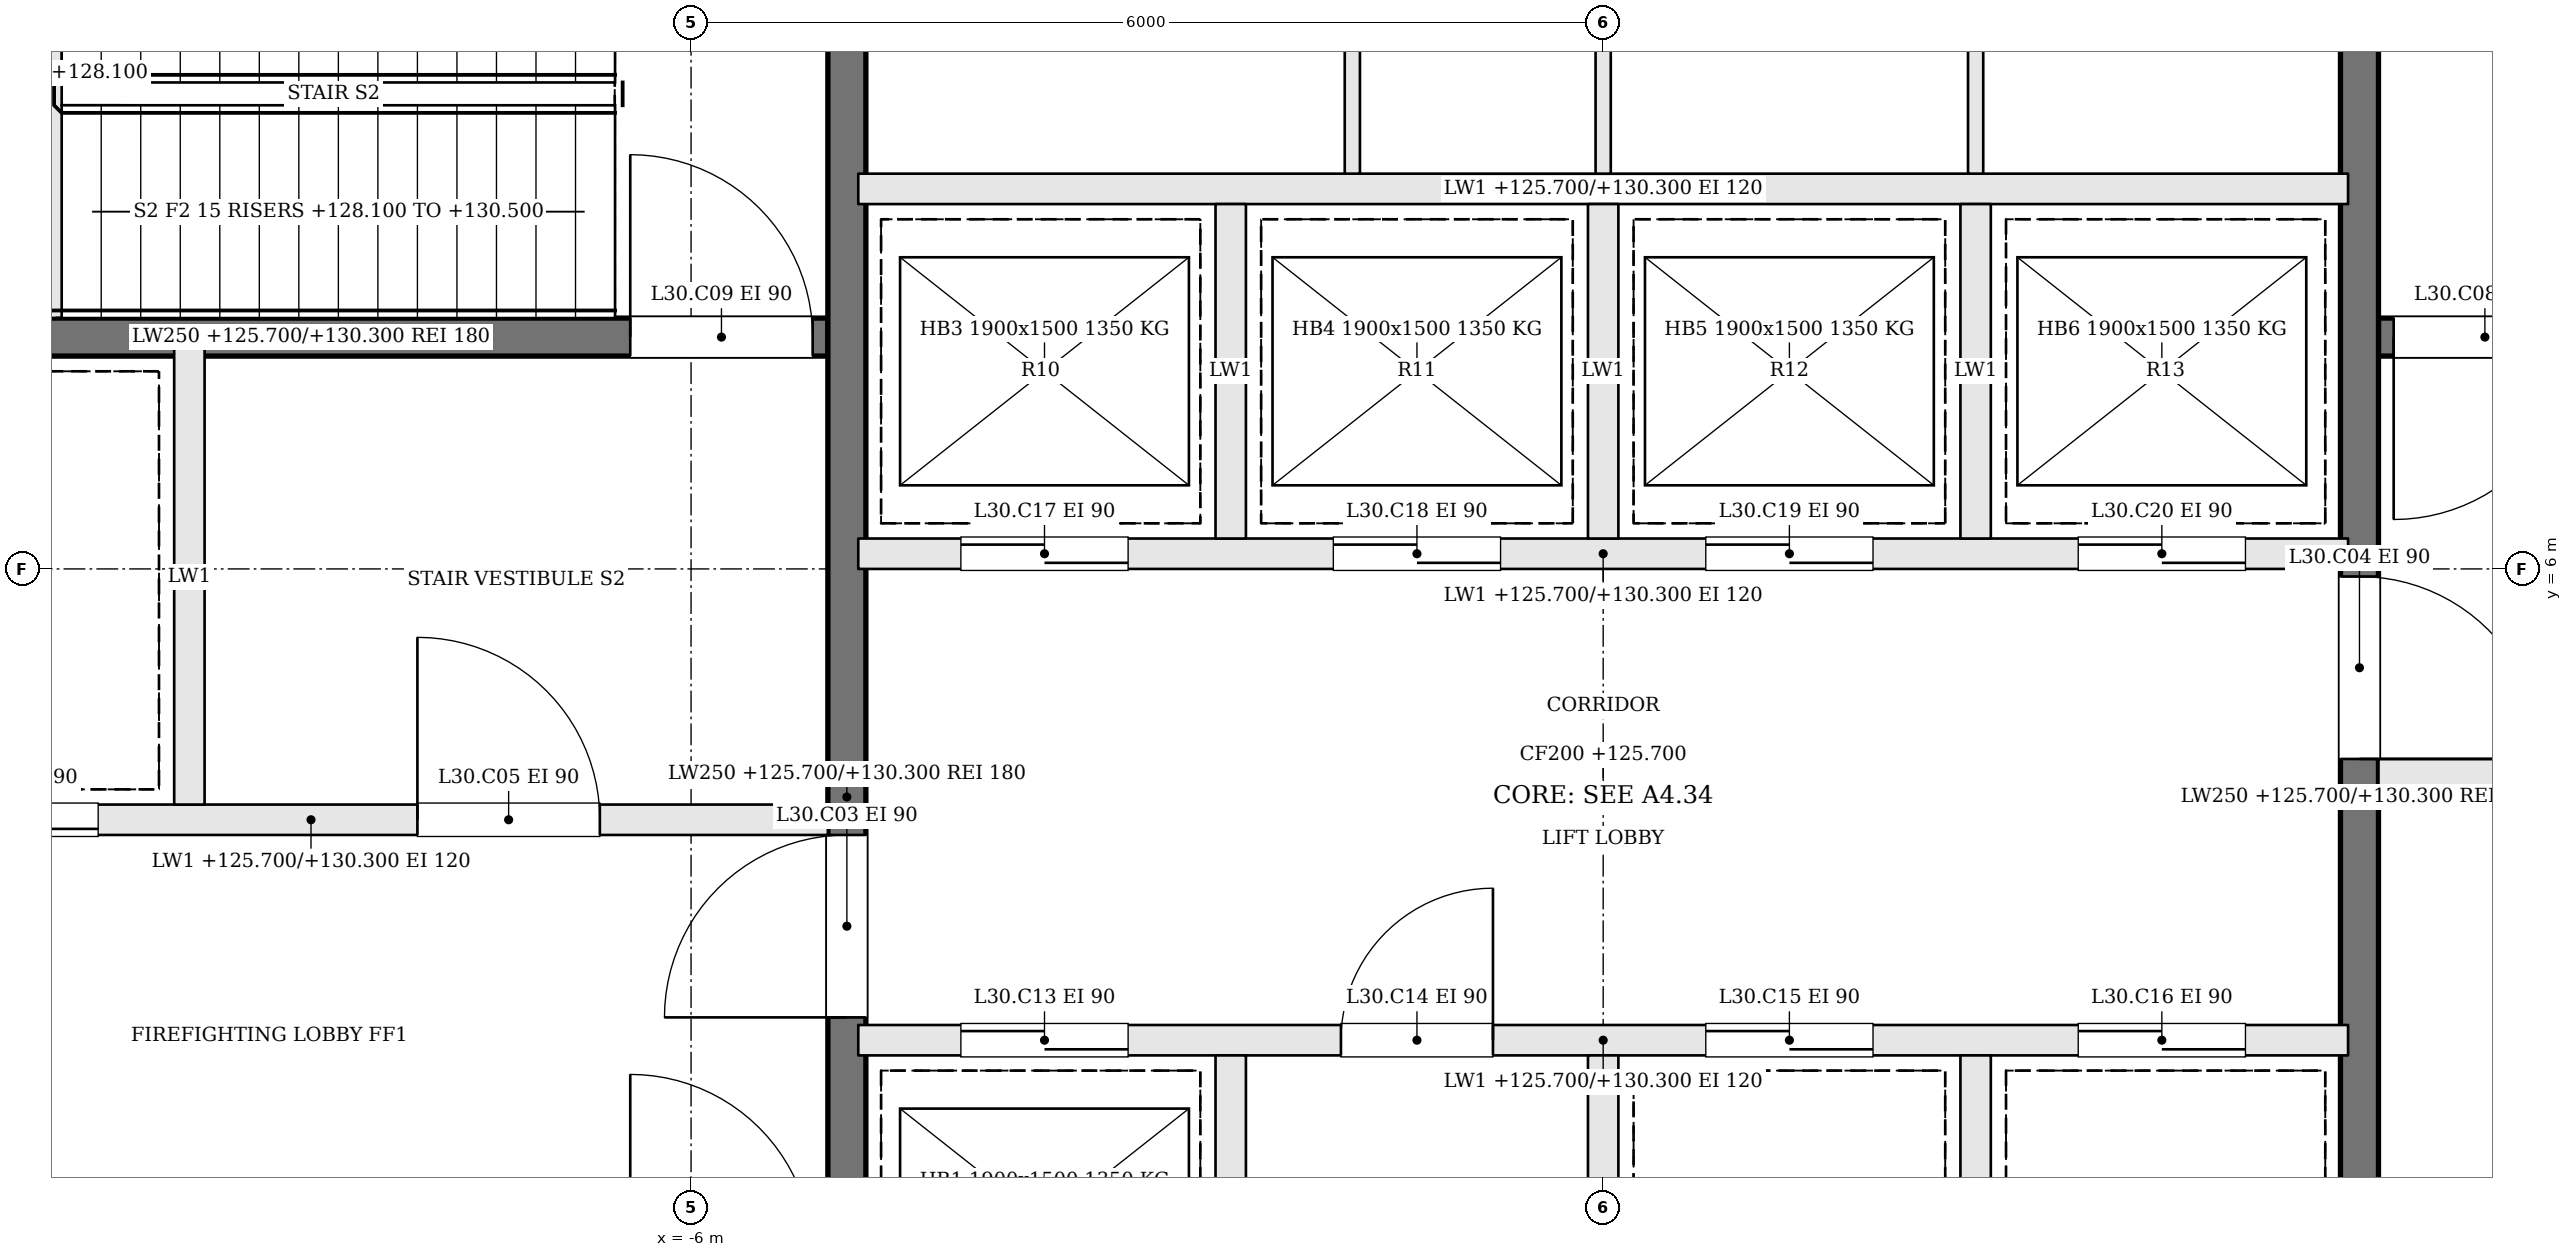
"""IFC4 building model, lengths in metres.
Left out: names, types, materials, properties, quantities, classifications, styles, units other than length and angle.
Written with IfcOpenShell. Run it as: python <this file> out.ifc"""

import sys

from ifc_helpers import new_model, si_unit, direction, frame, frame_2d, origin, place, context, subcontext, project, spatial, rectangle, extrude, element, fill, save


model = new_model("IFC4")
c1 = context("Model", 3, precision=1e-05, world=origin(), true_north=direction((0.0, 1.0)))
c2 = subcontext(c1, "Body", "Model", "MODEL_VIEW")
j1 = project(units=[si_unit("LENGTHUNIT", "METRE"), si_unit("PLANEANGLEUNIT", "RADIAN")], contexts=[c1])
p1 = place(None, origin())
s1 = spatial("IfcSite", under=j1, at=p1, CompositionType="ELEMENT")
p2 = place(p1, origin())
s2 = spatial("IfcBuilding", under=s1, at=p2, CompositionType="ELEMENT")
p3 = place(p2, frame((0.0, 0.0, 125.7)))
s3 = spatial("IfcBuildingStorey", under=s2, at=p3, CompositionType="ELEMENT", Elevation=125.7)
p4 = place(p3, frame((11.9, 7.525, 0.0), z_axis=(0.0, 0.0, 1.0), x_axis=(-1.0, 0.0, 0.0)))
e1 = element("IfcWall", 1, at=p4, inside=s3, PredefinedType="SOLIDWALL", context=c2, shape_type="SweptSolid", body=[
    extrude(rectangle(XDim=6.8, YDim=0.25, at=frame_2d((3.4, 0.0))), origin(), (0.0, 0.0, 1.0), 4.6),
])
p5 = place(p4, frame((5.5, 0.0, 0.0)))
e2 = element("IfcOpeningElement", 2, at=p5, cuts=e1, PredefinedType="OPENING", context=c2, shape_type="SweptSolid", body=[
    extrude(rectangle(XDim=1.2, YDim=2.1, at=frame_2d((0.6, 1.05))), frame((0.0, 0.135, 0.0), z_axis=(0.0, -1.0, 0.0), x_axis=(1.0, 0.0, 0.0)), (0.0, 0.0, 1.0), 0.27),
])
p6 = place(p3, frame((-11.9, 4.35, 0.0), z_axis=(0.0, 0.0, 1.0), x_axis=(1.0, 0.0, 0.0)))
e3 = element("IfcWall", 3, at=p6, inside=s3, PredefinedType="SOLIDWALL", context=c2, shape_type="SweptSolid", body=[
    extrude(rectangle(XDim=6.8, YDim=0.2, at=frame_2d((3.4, 0.0))), origin(), (0.0, 0.0, 1.0), 4.6),
])
p7 = place(p6, frame((4.1, 0.0, 0.0)))
e4 = element("IfcOpeningElement", 4, at=p7, cuts=e3, PredefinedType="OPENING", context=c2, shape_type="SweptSolid", body=[
    extrude(rectangle(XDim=1.2, YDim=2.1, at=frame_2d((0.6, 1.05))), frame((0.0, 0.11, 0.0), z_axis=(0.0, -1.0, 0.0), x_axis=(1.0, 0.0, 0.0)), (0.0, 0.0, 1.0), 0.22),
])
p8 = place(p6, frame((0.8, 0.0, 0.0)))
e5 = element("IfcOpeningElement", 5, at=p8, cuts=e3, PredefinedType="OPENING", context=c2, shape_type="SweptSolid", body=[
    extrude(rectangle(XDim=1.2, YDim=2.1, at=frame_2d((0.6, 1.05))), frame((0.0, 0.11, 0.0), z_axis=(0.0, -1.0, 0.0), x_axis=(1.0, 0.0, 0.0)), (0.0, 0.0, 1.0), 0.22),
])
p9 = place(p3, frame((11.9, 4.65, 0.0), z_axis=(0.0, 0.0, 1.0), x_axis=(-1.0, 0.0, 0.0)))
e6 = element("IfcWall", 6, at=p9, inside=s3, PredefinedType="SOLIDWALL", context=c2, shape_type="SweptSolid", body=[
    extrude(rectangle(XDim=6.8, YDim=0.2, at=frame_2d((3.4, 0.0))), origin(), (0.0, 0.0, 1.0), 4.6),
])
p10 = place(p9, frame((4.1, 0.0, 0.0)))
e7 = element("IfcOpeningElement", 7, at=p10, cuts=e6, PredefinedType="OPENING", context=c2, shape_type="SweptSolid", body=[
    extrude(rectangle(XDim=1.2, YDim=2.1, at=frame_2d((0.6, 1.05))), frame((0.0, 0.11, 0.0), z_axis=(0.0, -1.0, 0.0), x_axis=(1.0, 0.0, 0.0)), (0.0, 0.0, 1.0), 0.22),
])
p11 = place(p9, frame((0.8, 0.0, 0.0)))
e8 = element("IfcOpeningElement", 8, at=p11, cuts=e6, PredefinedType="OPENING", context=c2, shape_type="SweptSolid", body=[
    extrude(rectangle(XDim=1.2, YDim=2.1, at=frame_2d((0.6, 1.05))), frame((0.0, 0.11, 0.0), z_axis=(0.0, -1.0, 0.0), x_axis=(1.0, 0.0, 0.0)), (0.0, 0.0, 1.0), 0.22),
])
p12 = place(p3, frame((-11.9, 7.525, 0.0), z_axis=(0.0, 0.0, 1.0), x_axis=(1.0, 0.0, 0.0)))
e9 = element("IfcWall", 9, at=p12, inside=s3, PredefinedType="SOLIDWALL", context=c2, shape_type="SweptSolid", body=[
    extrude(rectangle(XDim=6.8, YDim=0.25, at=frame_2d((3.4, 0.0))), origin(), (0.0, 0.0, 1.0), 4.6),
])
p13 = place(p12, frame((5.5, 0.0, 0.0)))
e10 = element("IfcOpeningElement", 10, at=p13, cuts=e9, PredefinedType="OPENING", context=c2, shape_type="SweptSolid", body=[
    extrude(rectangle(XDim=1.2, YDim=2.1, at=frame_2d((0.6, 1.05))), frame((0.0, 0.135, 0.0), z_axis=(0.0, -1.0, 0.0), x_axis=(1.0, 0.0, 0.0)), (0.0, 0.0, 1.0), 0.27),
])
p14 = place(p3, frame((-9.3, 4.45, 0.0), z_axis=(0.0, 0.0, 1.0), x_axis=(0.0, 1.0, 0.0)))
e11 = element("IfcWall", 11, at=p14, inside=s3, PredefinedType="SOLIDWALL", context=c2, shape_type="SweptSolid", body=[
    extrude(rectangle(XDim=3.0, YDim=0.2, at=frame_2d((1.5, 0.0))), origin(), (0.0, 0.0, 1.0), 4.6),
])
p15 = place(p3, frame((-4.975, -1.9, 0.0), z_axis=(0.0, 0.0, 1.0), x_axis=(0.0, 1.0, 0.0)))
e12 = element("IfcWall", 12, at=p15, inside=s3, PredefinedType="SOLIDWALL", context=c2, shape_type="SweptSolid", body=[
    extrude(rectangle(XDim=12.8, YDim=0.25, at=frame_2d((6.4, 0.0))), origin(), (0.0, 0.0, 1.0), 4.6),
])
p16 = place(p15, frame((4.95, 0.0, 0.0)))
e13 = element("IfcOpeningElement", 13, at=p16, cuts=e12, PredefinedType="OPENING", context=c2, shape_type="SweptSolid", body=[
    extrude(rectangle(XDim=1.2, YDim=2.1, at=frame_2d((0.6, 1.05))), frame((0.0, 0.135, 0.0), z_axis=(0.0, -1.0, 0.0), x_axis=(1.0, 0.0, 0.0)), (0.0, 0.0, 1.0), 0.27),
])
p17 = place(p3, frame((4.975, 10.9, 0.0), z_axis=(0.0, 0.0, 1.0), x_axis=(0.0, -1.0, 0.0)))
e14 = element("IfcWall", 14, at=p17, inside=s3, PredefinedType="SOLIDWALL", context=c2, shape_type="SweptSolid", body=[
    extrude(rectangle(XDim=12.8, YDim=0.25, at=frame_2d((6.4, 0.0))), origin(), (0.0, 0.0, 1.0), 4.6),
])
p18 = place(p17, frame((4.95, 0.0, 0.0)))
e15 = element("IfcOpeningElement", 15, at=p18, cuts=e14, PredefinedType="OPENING", context=c2, shape_type="SweptSolid", body=[
    extrude(rectangle(XDim=1.2, YDim=2.1, at=frame_2d((0.6, 1.05))), frame((0.0, 0.135, 0.0), z_axis=(0.0, -1.0, 0.0), x_axis=(1.0, 0.0, 0.0)), (0.0, 0.0, 1.0), 0.27),
])
p19 = place(p3, frame((-4.9, 2.9, 0.0), z_axis=(0.0, 0.0, 1.0), x_axis=(1.0, 0.0, 0.0)))
e16 = element("IfcWall", 16, at=p19, inside=s3, PredefinedType="SOLIDWALL", context=c2, shape_type="SweptSolid", body=[
    extrude(rectangle(XDim=9.8, YDim=0.2, at=frame_2d((4.9, 0.0))), origin(), (0.0, 0.0, 1.0), 4.6),
])
p20 = place(p19, frame((0.675, 0.0, 0.0)))
e17 = element("IfcOpeningElement", 17, at=p20, cuts=e16, PredefinedType="OPENING", context=c2, shape_type="SweptSolid", body=[
    extrude(rectangle(XDim=1.1, YDim=2.1, at=frame_2d((0.55, 1.05))), frame((0.0, 0.11, 0.0), z_axis=(0.0, -1.0, 0.0), x_axis=(1.0, 0.0, 0.0)), (0.0, 0.0, 1.0), 0.22),
])
p21 = place(p19, frame((3.175, 0.0, 0.0)))
e18 = element("IfcOpeningElement", 18, at=p21, cuts=e16, PredefinedType="OPENING", context=c2, shape_type="SweptSolid", body=[
    extrude(rectangle(XDim=1.0, YDim=2.1, at=frame_2d((0.5, 1.05))), frame((0.0, 0.11, 0.0), z_axis=(0.0, -1.0, 0.0), x_axis=(1.0, 0.0, 0.0)), (0.0, 0.0, 1.0), 0.22),
])
p22 = place(p19, frame((5.575, 0.0, 0.0)))
e19 = element("IfcOpeningElement", 19, at=p22, cuts=e16, PredefinedType="OPENING", context=c2, shape_type="SweptSolid", body=[
    extrude(rectangle(XDim=1.1, YDim=2.1, at=frame_2d((0.55, 1.05))), frame((0.0, 0.11, 0.0), z_axis=(0.0, -1.0, 0.0), x_axis=(1.0, 0.0, 0.0)), (0.0, 0.0, 1.0), 0.22),
])
p23 = place(p19, frame((8.025, 0.0, 0.0)))
e20 = element("IfcOpeningElement", 20, at=p23, cuts=e16, PredefinedType="OPENING", context=c2, shape_type="SweptSolid", body=[
    extrude(rectangle(XDim=1.1, YDim=2.1, at=frame_2d((0.55, 1.05))), frame((0.0, 0.11, 0.0), z_axis=(0.0, -1.0, 0.0), x_axis=(1.0, 0.0, 0.0)), (0.0, 0.0, 1.0), 0.22),
])
p24 = place(p3, frame((-4.9, 6.1, 0.0), z_axis=(0.0, 0.0, 1.0), x_axis=(1.0, 0.0, 0.0)))
e21 = element("IfcWall", 21, at=p24, inside=s3, PredefinedType="SOLIDWALL", context=c2, shape_type="SweptSolid", body=[
    extrude(rectangle(XDim=9.8, YDim=0.2, at=frame_2d((4.9, 0.0))), origin(), (0.0, 0.0, 1.0), 4.6),
])
p25 = place(p24, frame((0.675, 0.0, 0.0)))
e22 = element("IfcOpeningElement", 22, at=p25, cuts=e21, PredefinedType="OPENING", context=c2, shape_type="SweptSolid", body=[
    extrude(rectangle(XDim=1.1, YDim=2.1, at=frame_2d((0.55, 1.05))), frame((0.0, 0.11, 0.0), z_axis=(0.0, -1.0, 0.0), x_axis=(1.0, 0.0, 0.0)), (0.0, 0.0, 1.0), 0.22),
])
p26 = place(p24, frame((3.125, 0.0, 0.0)))
e23 = element("IfcOpeningElement", 23, at=p26, cuts=e21, PredefinedType="OPENING", context=c2, shape_type="SweptSolid", body=[
    extrude(rectangle(XDim=1.1, YDim=2.1, at=frame_2d((0.55, 1.05))), frame((0.0, 0.11, 0.0), z_axis=(0.0, -1.0, 0.0), x_axis=(1.0, 0.0, 0.0)), (0.0, 0.0, 1.0), 0.22),
])
p27 = place(p24, frame((5.575, 0.0, 0.0)))
e24 = element("IfcOpeningElement", 24, at=p27, cuts=e21, PredefinedType="OPENING", context=c2, shape_type="SweptSolid", body=[
    extrude(rectangle(XDim=1.1, YDim=2.1, at=frame_2d((0.55, 1.05))), frame((0.0, 0.11, 0.0), z_axis=(0.0, -1.0, 0.0), x_axis=(1.0, 0.0, 0.0)), (0.0, 0.0, 1.0), 0.22),
])
p28 = place(p24, frame((8.025, 0.0, 0.0)))
e25 = element("IfcOpeningElement", 25, at=p28, cuts=e21, PredefinedType="OPENING", context=c2, shape_type="SweptSolid", body=[
    extrude(rectangle(XDim=1.1, YDim=2.1, at=frame_2d((0.55, 1.05))), frame((0.0, 0.11, 0.0), z_axis=(0.0, -1.0, 0.0), x_axis=(1.0, 0.0, 0.0)), (0.0, 0.0, 1.0), 0.22),
])
p29 = place(p3, frame((-4.9, 8.5, 0.0), z_axis=(0.0, 0.0, 1.0), x_axis=(1.0, 0.0, 0.0)))
e26 = element("IfcWall", 26, at=p29, inside=s3, PredefinedType="SOLIDWALL", context=c2, shape_type="SweptSolid", body=[
    extrude(rectangle(XDim=9.8, YDim=0.2, at=frame_2d((4.9, 0.0))), origin(), (0.0, 0.0, 1.0), 4.6),
])
for number, where, z_axis, x_axis in (
    (27, (-2.45, 0.6, 0.0), (0.0, 0.0, 1.0), (0.0, 1.0, 0.0)),
    (28, (0.0, 0.6, 0.0), (0.0, 0.0, 1.0), (0.0, 1.0, 0.0)),
    (29, (2.45, 0.6, 0.0), (0.0, 0.0, 1.0), (0.0, 1.0, 0.0)),
    (30, (-2.45, 6.2, 0.0), (0.0, 0.0, 1.0), (0.0, 1.0, 0.0)),
    (31, (0.0, 6.2, 0.0), (0.0, 0.0, 1.0), (0.0, 1.0, 0.0)),
    (32, (2.45, 6.2, 0.0), (0.0, 0.0, 1.0), (0.0, 1.0, 0.0)),
):
    element("IfcWall", number, at=place(p3, frame(where, z_axis=z_axis, x_axis=x_axis)), inside=s3, PredefinedType="SOLIDWALL", context=c2, shape_type="SweptSolid", body=[
        extrude(rectangle(XDim=2.2, YDim=0.2, at=frame_2d((1.1, 0.0))), origin(), (0.0, 0.0, 1.0), 4.6),
    ])
for number, where, z_axis, x_axis in (
    (33, (-1.65, 8.6, 0.0), (0.0, 0.0, 1.0), (0.0, 1.0, 0.0)),
    (34, (0.0, 8.6, 0.0), (0.0, 0.0, 1.0), (0.0, 1.0, 0.0)),
    (35, (2.45, 8.6, 0.0), (0.0, 0.0, 1.0), (0.0, 1.0, 0.0)),
):
    element("IfcWall", number, at=place(p3, frame(where, z_axis=z_axis, x_axis=x_axis)), inside=s3, PredefinedType="PARTITIONING", context=c2, shape_type="SweptSolid", body=[
        extrude(rectangle(XDim=2.3, YDim=0.1, at=frame_2d((1.15, 0.0))), origin(), (0.0, 0.0, 1.0), 4.6),
    ])
p30 = place(p16, origin())
e36 = element("IfcDoor", 36, at=p30, inside=s3, OperationType="SINGLE_SWING_LEFT", PredefinedType="DOOR", context=c2, shape_type="SweptSolid", body=[
    extrude(rectangle(XDim=1.2, YDim=2.1, at=frame_2d((0.6, 1.05))), frame((0.0, 0.025, 0.0), z_axis=(0.0, -1.0, 0.0), x_axis=(1.0, 0.0, 0.0)), (0.0, 0.0, 1.0), 0.05),
])
fill(e13, e36)
p31 = place(p18, origin())
e37 = element("IfcDoor", 37, at=p31, inside=s3, OperationType="SINGLE_SWING_RIGHT", PredefinedType="DOOR", context=c2, shape_type="SweptSolid", body=[
    extrude(rectangle(XDim=1.2, YDim=2.1, at=frame_2d((0.6, 1.05))), frame((0.0, 0.025, 0.0), z_axis=(0.0, -1.0, 0.0), x_axis=(1.0, 0.0, 0.0)), (0.0, 0.0, 1.0), 0.05),
])
fill(e15, e37)
p32 = place(p7, origin())
e38 = element("IfcDoor", 38, at=p32, inside=s3, OperationType="SINGLE_SWING_LEFT", PredefinedType="DOOR", context=c2, shape_type="SweptSolid", body=[
    extrude(rectangle(XDim=1.2, YDim=2.1, at=frame_2d((0.6, 1.05))), frame((0.0, 0.025, 0.0), z_axis=(0.0, -1.0, 0.0), x_axis=(1.0, 0.0, 0.0)), (0.0, 0.0, 1.0), 0.05),
])
fill(e4, e38)
p33 = place(p5, origin())
e39 = element("IfcDoor", 39, at=p33, inside=s3, OperationType="SINGLE_SWING_RIGHT", PredefinedType="DOOR", context=c2, shape_type="SweptSolid", body=[
    extrude(rectangle(XDim=1.2, YDim=2.1, at=frame_2d((0.6, 1.05))), frame((0.0, 0.025, 0.0), z_axis=(0.0, -1.0, 0.0), x_axis=(1.0, 0.0, 0.0)), (0.0, 0.0, 1.0), 0.05),
])
fill(e2, e39)
p34 = place(p13, origin())
e40 = element("IfcDoor", 40, at=p34, inside=s3, OperationType="SINGLE_SWING_LEFT", PredefinedType="DOOR", context=c2, shape_type="SweptSolid", body=[
    extrude(rectangle(XDim=1.2, YDim=2.1, at=frame_2d((0.6, 1.05))), frame((0.0, 0.025, 0.0), z_axis=(0.0, -1.0, 0.0), x_axis=(1.0, 0.0, 0.0)), (0.0, 0.0, 1.0), 0.05),
])
fill(e10, e40)
p35 = place(p8, origin())
e41 = element("IfcDoor", 41, at=p35, inside=s3, OperationType="SLIDING_TO_RIGHT", PredefinedType="DOOR", context=c2, shape_type="SweptSolid", body=[
    extrude(rectangle(XDim=1.2, YDim=2.1, at=frame_2d((0.6, 1.05))), frame((0.0, 0.025, 0.0), z_axis=(0.0, -1.0, 0.0), x_axis=(1.0, 0.0, 0.0)), (0.0, 0.0, 1.0), 0.05),
])
fill(e5, e41)
p36 = place(p20, origin())
e42 = element("IfcDoor", 42, at=p36, inside=s3, OperationType="SLIDING_TO_RIGHT", PredefinedType="DOOR", context=c2, shape_type="SweptSolid", body=[
    extrude(rectangle(XDim=1.1, YDim=2.1, at=frame_2d((0.55, 1.05))), frame((0.0, 0.025, 0.0), z_axis=(0.0, -1.0, 0.0), x_axis=(1.0, 0.0, 0.0)), (0.0, 0.0, 1.0), 0.05),
])
fill(e17, e42)
p37 = place(p21, origin())
e43 = element("IfcDoor", 43, at=p37, inside=s3, OperationType="SINGLE_SWING_RIGHT", PredefinedType="DOOR", context=c2, shape_type="SweptSolid", body=[
    extrude(rectangle(XDim=1.0, YDim=2.1, at=frame_2d((0.5, 1.05))), frame((0.0, 0.025, 0.0), z_axis=(0.0, -1.0, 0.0), x_axis=(1.0, 0.0, 0.0)), (0.0, 0.0, 1.0), 0.05),
])
fill(e18, e43)
p38 = place(p22, origin())
e44 = element("IfcDoor", 44, at=p38, inside=s3, OperationType="SLIDING_TO_LEFT", PredefinedType="DOOR", context=c2, shape_type="SweptSolid", body=[
    extrude(rectangle(XDim=1.1, YDim=2.1, at=frame_2d((0.55, 1.05))), frame((0.0, 0.025, 0.0), z_axis=(0.0, -1.0, 0.0), x_axis=(1.0, 0.0, 0.0)), (0.0, 0.0, 1.0), 0.05),
])
fill(e19, e44)
p39 = place(p23, origin())
e45 = element("IfcDoor", 45, at=p39, inside=s3, OperationType="SLIDING_TO_RIGHT", PredefinedType="DOOR", context=c2, shape_type="SweptSolid", body=[
    extrude(rectangle(XDim=1.1, YDim=2.1, at=frame_2d((0.55, 1.05))), frame((0.0, 0.025, 0.0), z_axis=(0.0, -1.0, 0.0), x_axis=(1.0, 0.0, 0.0)), (0.0, 0.0, 1.0), 0.05),
])
fill(e20, e45)
p40 = place(p25, origin())
e46 = element("IfcDoor", 46, at=p40, inside=s3, OperationType="SLIDING_TO_RIGHT", PredefinedType="DOOR", context=c2, shape_type="SweptSolid", body=[
    extrude(rectangle(XDim=1.1, YDim=2.1, at=frame_2d((0.55, 1.05))), frame((0.0, 0.025, 0.0), z_axis=(0.0, -1.0, 0.0), x_axis=(1.0, 0.0, 0.0)), (0.0, 0.0, 1.0), 0.05),
])
fill(e22, e46)
p41 = place(p26, origin())
e47 = element("IfcDoor", 47, at=p41, inside=s3, OperationType="SLIDING_TO_LEFT", PredefinedType="DOOR", context=c2, shape_type="SweptSolid", body=[
    extrude(rectangle(XDim=1.1, YDim=2.1, at=frame_2d((0.55, 1.05))), frame((0.0, 0.025, 0.0), z_axis=(0.0, -1.0, 0.0), x_axis=(1.0, 0.0, 0.0)), (0.0, 0.0, 1.0), 0.05),
])
fill(e23, e47)
p42 = place(p27, origin())
e48 = element("IfcDoor", 48, at=p42, inside=s3, OperationType="SLIDING_TO_RIGHT", PredefinedType="DOOR", context=c2, shape_type="SweptSolid", body=[
    extrude(rectangle(XDim=1.1, YDim=2.1, at=frame_2d((0.55, 1.05))), frame((0.0, 0.025, 0.0), z_axis=(0.0, -1.0, 0.0), x_axis=(1.0, 0.0, 0.0)), (0.0, 0.0, 1.0), 0.05),
])
fill(e24, e48)
p43 = place(p28, origin())
e49 = element("IfcDoor", 49, at=p43, inside=s3, OperationType="SLIDING_TO_LEFT", PredefinedType="DOOR", context=c2, shape_type="SweptSolid", body=[
    extrude(rectangle(XDim=1.1, YDim=2.1, at=frame_2d((0.55, 1.05))), frame((0.0, 0.025, 0.0), z_axis=(0.0, -1.0, 0.0), x_axis=(1.0, 0.0, 0.0)), (0.0, 0.0, 1.0), 0.05),
])
fill(e25, e49)
save(model, sys.argv[1])
